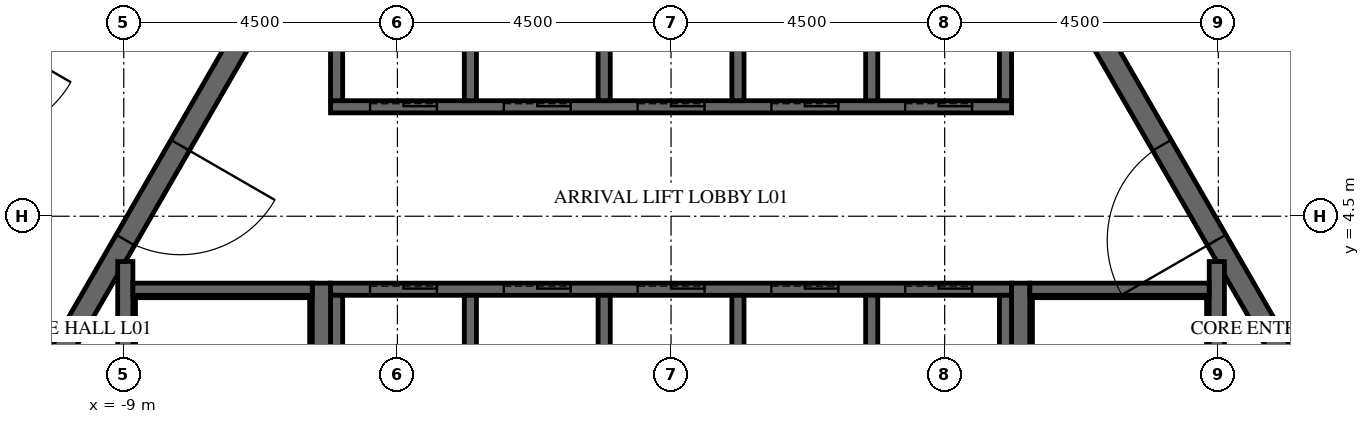
"""IFC4 building model, lengths in metres.
Left out: names, types, materials, properties, quantities, classifications, styles, units other than length and angle.
Written with IfcOpenShell. Run it as: python <this file> out.ifc"""

import sys

from ifc_helpers import new_model, si_unit, direction, frame, frame_2d, origin, place, context, subcontext, project, spatial, polyline, rectangle, outline, extrude, element, fill, save


model = new_model("IFC4")
c1 = context("Model", 3, precision=1e-05, world=origin(), true_north=direction((0.0, 1.0)))
c2 = subcontext(c1, "Body", "Model", "MODEL_VIEW")
j1 = project(units=[si_unit("LENGTHUNIT", "METRE"), si_unit("PLANEANGLEUNIT", "RADIAN")], contexts=[c1])
p1 = place(None, origin())
s1 = spatial("IfcSite", under=j1, at=p1, CompositionType="ELEMENT")
p2 = place(p1, origin())
s2 = spatial("IfcBuilding", under=s1, at=p2, CompositionType="ELEMENT")
p3 = place(p2, frame((0.0, 0.0, 9.0)))
s3 = spatial("IfcBuildingStorey", under=s2, at=p3, CompositionType="ELEMENT", Elevation=9.0)
p4 = place(p3, frame((-7.91, 13.7, -0.25), z_axis=(0.0, 0.0, 1.0), x_axis=(-0.499999880136, -0.866025472988, 0.0)))
e1 = element("IfcWall", 1, at=p4, inside=s3, PredefinedType="SHEAR", context=c2, shape_type="SweptSolid", body=[
    extrude(outline(polyline([(-0.173, -0.3), (15.993, -0.3), (15.646, 0.3), (0.173, 0.3), (-0.173, -0.3)])), origin(), (0.0, 0.0, 1.0), 6.0),
])
p5 = place(p4, frame((7.039, 0.0, 0.25)))
e2 = element("IfcOpeningElement", 2, at=p5, cuts=e1, PredefinedType="OPENING", context=c2, shape_type="SweptSolid", body=[
    extrude(rectangle(XDim=1.8, YDim=2.4, at=frame_2d((0.9, 1.2))), frame((0.0, 0.31, 0.0), z_axis=(0.0, -1.0, 0.0), x_axis=(1.0, 0.0, 0.0)), (0.0, 0.0, 1.0), 0.62),
])
p6 = place(p3, frame((15.819, 0.0, -0.25), z_axis=(0.0, 0.0, 1.0), x_axis=(-0.499999880136, 0.866025472988, 0.0)))
e3 = element("IfcWall", 3, at=p6, inside=s3, PredefinedType="SHEAR", context=c2, shape_type="SweptSolid", body=[
    extrude(outline(polyline([(-0.173, -0.3), (15.993, -0.3), (15.646, 0.3), (0.173, 0.3), (-0.173, -0.3)])), origin(), (0.0, 0.0, 1.0), 6.0),
])
p7 = place(p6, frame((6.981, 0.0, 0.25)))
e4 = element("IfcOpeningElement", 4, at=p7, cuts=e3, PredefinedType="OPENING", context=c2, shape_type="SweptSolid", body=[
    extrude(rectangle(XDim=1.8, YDim=2.4, at=frame_2d((0.9, 1.2))), frame((0.0, 0.31, 0.0), z_axis=(0.0, -1.0, 0.0), x_axis=(1.0, 0.0, 0.0)), (0.0, 0.0, 1.0), 0.62),
])
p8 = place(p3, frame((-5.673, 9.825, -0.25), z_axis=(0.0, 0.0, 1.0), x_axis=(-0.499995046907, -0.866028263435, 0.0)))
e5 = element("IfcWall", 5, at=p8, inside=s3, PredefinedType="SHEAR", context=c2, shape_type="SweptSolid", body=[
    extrude(outline(polyline([(-0.101, -0.175), (11.446, -0.175), (11.244, 0.175), (0.101, 0.175), (-0.101, -0.175)])), origin(), (0.0, 0.0, 1.0), 6.0),
])
p9 = place(p8, frame((4.801, 0.0, 0.25)))
e6 = element("IfcOpeningElement", 6, at=p9, cuts=e5, PredefinedType="OPENING", context=c2, shape_type="SweptSolid", body=[
    extrude(rectangle(XDim=1.8, YDim=2.4, at=frame_2d((0.9, 1.2))), frame((0.0, 0.185, 0.0), z_axis=(0.0, -1.0, 0.0), x_axis=(1.0, 0.0, 0.0)), (0.0, 0.0, 1.0), 0.37),
])
p10 = place(p3, frame((11.345, 0.0, -0.25), z_axis=(0.0, 0.0, 1.0), x_axis=(-0.499995046907, 0.866028263435, 0.0)))
e7 = element("IfcWall", 7, at=p10, inside=s3, PredefinedType="SHEAR", context=c2, shape_type="SweptSolid", body=[
    extrude(outline(polyline([(-0.101, -0.175), (11.446, -0.175), (11.244, 0.175), (0.101, 0.175), (-0.101, -0.175)])), origin(), (0.0, 0.0, 1.0), 6.0),
])
p11 = place(p10, frame((4.744, 0.0, 0.25)))
e8 = element("IfcOpeningElement", 8, at=p11, cuts=e7, PredefinedType="OPENING", context=c2, shape_type="SweptSolid", body=[
    extrude(rectangle(XDim=1.8, YDim=2.4, at=frame_2d((0.9, 1.2))), frame((0.0, 0.185, 0.0), z_axis=(0.0, -1.0, 0.0), x_axis=(1.0, 0.0, 0.0)), (0.0, 0.0, 1.0), 0.37),
])
p12 = place(p3, frame((-5.6, 6.3, -0.25), z_axis=(0.0, 0.0, 1.0), x_axis=(1.0, 0.0, 0.0)))
e9 = element("IfcWall", 9, at=p12, inside=s3, PredefinedType="SHEAR", context=c2, shape_type="SweptSolid", body=[
    extrude(rectangle(XDim=11.2, YDim=0.2, at=frame_2d((5.6, 0.0))), origin(), (0.0, 0.0, 1.0), 6.0),
])
p13 = place(p12, frame((0.65, 0.0, 0.25)))
e10 = element("IfcOpeningElement", 10, at=p13, cuts=e9, PredefinedType="OPENING", context=c2, shape_type="SweptSolid", body=[
    extrude(rectangle(XDim=1.1, YDim=2.1, at=frame_2d((0.55, 1.05))), frame((0.0, 0.11, 0.0), z_axis=(0.0, -1.0, 0.0), x_axis=(1.0, 0.0, 0.0)), (0.0, 0.0, 1.0), 0.22),
])
p14 = place(p12, frame((2.85, 0.0, 0.25)))
e11 = element("IfcOpeningElement", 11, at=p14, cuts=e9, PredefinedType="OPENING", context=c2, shape_type="SweptSolid", body=[
    extrude(rectangle(XDim=1.1, YDim=2.1, at=frame_2d((0.55, 1.05))), frame((0.0, 0.11, 0.0), z_axis=(0.0, -1.0, 0.0), x_axis=(1.0, 0.0, 0.0)), (0.0, 0.0, 1.0), 0.22),
])
p15 = place(p12, frame((5.05, 0.0, 0.25)))
e12 = element("IfcOpeningElement", 12, at=p15, cuts=e9, PredefinedType="OPENING", context=c2, shape_type="SweptSolid", body=[
    extrude(rectangle(XDim=1.1, YDim=2.1, at=frame_2d((0.55, 1.05))), frame((0.0, 0.11, 0.0), z_axis=(0.0, -1.0, 0.0), x_axis=(1.0, 0.0, 0.0)), (0.0, 0.0, 1.0), 0.22),
])
p16 = place(p12, frame((7.25, 0.0, 0.25)))
e13 = element("IfcOpeningElement", 13, at=p16, cuts=e9, PredefinedType="OPENING", context=c2, shape_type="SweptSolid", body=[
    extrude(rectangle(XDim=1.1, YDim=2.1, at=frame_2d((0.55, 1.05))), frame((0.0, 0.11, 0.0), z_axis=(0.0, -1.0, 0.0), x_axis=(1.0, 0.0, 0.0)), (0.0, 0.0, 1.0), 0.22),
])
p17 = place(p12, frame((9.45, 0.0, 0.25)))
e14 = element("IfcOpeningElement", 14, at=p17, cuts=e9, PredefinedType="OPENING", context=c2, shape_type="SweptSolid", body=[
    extrude(rectangle(XDim=1.1, YDim=2.1, at=frame_2d((0.55, 1.05))), frame((0.0, 0.11, 0.0), z_axis=(0.0, -1.0, 0.0), x_axis=(1.0, 0.0, 0.0)), (0.0, 0.0, 1.0), 0.22),
])
for number, where, z_axis, x_axis in (
    (15, (-5.5, 6.4, -0.25), (0.0, 0.0, 1.0), (0.0, 1.0, 0.0)),
    (16, (-3.3, 6.4, -0.25), (0.0, 0.0, 1.0), (0.0, 1.0, 0.0)),
    (17, (-1.1, 6.4, -0.25), (0.0, 0.0, 1.0), (0.0, 1.0, 0.0)),
    (18, (1.1, 6.4, -0.25), (0.0, 0.0, 1.0), (0.0, 1.0, 0.0)),
    (19, (3.3, 6.4, -0.25), (0.0, 0.0, 1.0), (0.0, 1.0, 0.0)),
    (20, (5.5, 6.4, -0.25), (0.0, 0.0, 1.0), (0.0, 1.0, 0.0)),
):
    element("IfcWall", number, at=place(p3, frame(where, z_axis=z_axis, x_axis=x_axis)), inside=s3, PredefinedType="SHEAR", context=c2, shape_type="SweptSolid", body=[
        extrude(rectangle(XDim=2.9, YDim=0.2, at=frame_2d((1.45, 0.0))), origin(), (0.0, 0.0, 1.0), 6.0),
    ])
p18 = place(p3, frame((-5.6, 3.3, -0.25), z_axis=(0.0, 0.0, 1.0), x_axis=(1.0, 0.0, 0.0)))
e21 = element("IfcWall", 21, at=p18, inside=s3, PredefinedType="SHEAR", context=c2, shape_type="SweptSolid", body=[
    extrude(rectangle(XDim=11.2, YDim=0.2, at=frame_2d((5.6, 0.0))), origin(), (0.0, 0.0, 1.0), 6.0),
])
p19 = place(p18, frame((0.65, 0.0, 0.25)))
e22 = element("IfcOpeningElement", 22, at=p19, cuts=e21, PredefinedType="OPENING", context=c2, shape_type="SweptSolid", body=[
    extrude(rectangle(XDim=1.1, YDim=2.1, at=frame_2d((0.55, 1.05))), frame((0.0, 0.11, 0.0), z_axis=(0.0, -1.0, 0.0), x_axis=(1.0, 0.0, 0.0)), (0.0, 0.0, 1.0), 0.22),
])
p20 = place(p18, frame((2.85, 0.0, 0.25)))
e23 = element("IfcOpeningElement", 23, at=p20, cuts=e21, PredefinedType="OPENING", context=c2, shape_type="SweptSolid", body=[
    extrude(rectangle(XDim=1.1, YDim=2.1, at=frame_2d((0.55, 1.05))), frame((0.0, 0.11, 0.0), z_axis=(0.0, -1.0, 0.0), x_axis=(1.0, 0.0, 0.0)), (0.0, 0.0, 1.0), 0.22),
])
p21 = place(p18, frame((5.05, 0.0, 0.25)))
e24 = element("IfcOpeningElement", 24, at=p21, cuts=e21, PredefinedType="OPENING", context=c2, shape_type="SweptSolid", body=[
    extrude(rectangle(XDim=1.1, YDim=2.1, at=frame_2d((0.55, 1.05))), frame((0.0, 0.11, 0.0), z_axis=(0.0, -1.0, 0.0), x_axis=(1.0, 0.0, 0.0)), (0.0, 0.0, 1.0), 0.22),
])
p22 = place(p18, frame((7.25, 0.0, 0.25)))
e25 = element("IfcOpeningElement", 25, at=p22, cuts=e21, PredefinedType="OPENING", context=c2, shape_type="SweptSolid", body=[
    extrude(rectangle(XDim=1.1, YDim=2.1, at=frame_2d((0.55, 1.05))), frame((0.0, 0.11, 0.0), z_axis=(0.0, -1.0, 0.0), x_axis=(1.0, 0.0, 0.0)), (0.0, 0.0, 1.0), 0.22),
])
p23 = place(p18, frame((9.45, 0.0, 0.25)))
e26 = element("IfcOpeningElement", 26, at=p23, cuts=e21, PredefinedType="OPENING", context=c2, shape_type="SweptSolid", body=[
    extrude(rectangle(XDim=1.1, YDim=2.1, at=frame_2d((0.55, 1.05))), frame((0.0, 0.11, 0.0), z_axis=(0.0, -1.0, 0.0), x_axis=(1.0, 0.0, 0.0)), (0.0, 0.0, 1.0), 0.22),
])
for number, where, z_axis, x_axis in (
    (27, (-5.5, 0.1, -0.25), (0.0, 0.0, 1.0), (0.0, 1.0, 0.0)),
    (28, (-3.3, 0.1, -0.25), (0.0, 0.0, 1.0), (0.0, 1.0, 0.0)),
    (29, (-1.1, 0.1, -0.25), (0.0, 0.0, 1.0), (0.0, 1.0, 0.0)),
    (30, (1.1, 0.1, -0.25), (0.0, 0.0, 1.0), (0.0, 1.0, 0.0)),
    (31, (3.3, 0.1, -0.25), (0.0, 0.0, 1.0), (0.0, 1.0, 0.0)),
    (32, (5.5, 0.1, -0.25), (0.0, 0.0, 1.0), (0.0, 1.0, 0.0)),
):
    element("IfcWall", number, at=place(p3, frame(where, z_axis=z_axis, x_axis=x_axis)), inside=s3, PredefinedType="SHEAR", context=c2, shape_type="SweptSolid", body=[
        extrude(rectangle(XDim=3.1, YDim=0.2, at=frame_2d((1.55, 0.0))), origin(), (0.0, 0.0, 1.0), 6.0),
    ])
p24 = place(p3, frame((5.75, -3.4, -0.25), z_axis=(0.0, 0.0, 1.0), x_axis=(0.0, 1.0, 0.0)))
e33 = element("IfcWall", 33, at=p24, inside=s3, PredefinedType="SHEAR", context=c2, shape_type="SweptSolid", body=[
    extrude(rectangle(XDim=6.8, YDim=0.3, at=frame_2d((3.4, 0.0))), origin(), (0.0, 0.0, 1.0), 6.0),
])
p25 = place(p3, frame((8.975, -3.755, -0.25), z_axis=(0.0, 0.0, 1.0), x_axis=(0.0, 1.0, 0.0)))
e34 = element("IfcWall", 34, at=p25, inside=s3, PredefinedType="SHEAR", context=c2, shape_type="SweptSolid", body=[
    extrude(rectangle(XDim=7.51, YDim=0.25, at=frame_2d((3.755, 0.0))), origin(), (0.0, 0.0, 1.0), 6.0),
])
p26 = place(p3, frame((5.9, 3.3, -0.25), z_axis=(0.0, 0.0, 1.0), x_axis=(1.0, 0.0, 0.0)))
e35 = element("IfcWall", 35, at=p26, inside=s3, PredefinedType="SHEAR", context=c2, shape_type="SweptSolid", body=[
    extrude(rectangle(XDim=2.95, YDim=0.2, at=frame_2d((1.475, 0.0))), origin(), (0.0, 0.0, 1.0), 6.0),
])
p27 = place(p3, frame((-5.75, -3.4, -0.25), z_axis=(0.0, 0.0, 1.0), x_axis=(0.0, 1.0, 0.0)))
e36 = element("IfcWall", 36, at=p27, inside=s3, PredefinedType="SHEAR", context=c2, shape_type="SweptSolid", body=[
    extrude(rectangle(XDim=6.8, YDim=0.3, at=frame_2d((3.4, 0.0))), origin(), (0.0, 0.0, 1.0), 6.0),
])
p28 = place(p3, frame((-8.975, -3.755, -0.25), z_axis=(0.0, 0.0, 1.0), x_axis=(0.0, 1.0, 0.0)))
e37 = element("IfcWall", 37, at=p28, inside=s3, PredefinedType="SHEAR", context=c2, shape_type="SweptSolid", body=[
    extrude(rectangle(XDim=7.51, YDim=0.25, at=frame_2d((3.755, 0.0))), origin(), (0.0, 0.0, 1.0), 6.0),
])
p29 = place(p3, frame((-8.85, 3.3, -0.25), z_axis=(0.0, 0.0, 1.0), x_axis=(1.0, 0.0, 0.0)))
e38 = element("IfcWall", 38, at=p29, inside=s3, PredefinedType="SHEAR", context=c2, shape_type="SweptSolid", body=[
    extrude(rectangle(XDim=2.95, YDim=0.2, at=frame_2d((1.475, 0.0))), origin(), (0.0, 0.0, 1.0), 6.0),
])
p30 = place(p9, origin())
e39 = element("IfcDoor", 39, at=p30, inside=s3, OperationType="DOUBLE_DOOR_SINGLE_SWING", PredefinedType="DOOR", context=c2, shape_type="SweptSolid", body=[
    extrude(rectangle(XDim=1.8, YDim=2.4, at=frame_2d((0.9, 1.2))), frame((0.0, 0.025, 0.0), z_axis=(0.0, -1.0, 0.0), x_axis=(1.0, 0.0, 0.0)), (0.0, 0.0, 1.0), 0.05),
])
fill(e6, e39)
p31 = place(p11, origin())
e40 = element("IfcDoor", 40, at=p31, inside=s3, OperationType="DOUBLE_DOOR_SINGLE_SWING", PredefinedType="DOOR", context=c2, shape_type="SweptSolid", body=[
    extrude(rectangle(XDim=1.8, YDim=2.4, at=frame_2d((0.9, 1.2))), frame((0.0, 0.025, 0.0), z_axis=(0.0, -1.0, 0.0), x_axis=(1.0, 0.0, 0.0)), (0.0, 0.0, 1.0), 0.05),
])
fill(e8, e40)
p32 = place(p13, origin())
e41 = element("IfcDoor", 41, at=p32, inside=s3, OperationType="SLIDING_TO_LEFT", PredefinedType="DOOR", context=c2, shape_type="SweptSolid", body=[
    extrude(rectangle(XDim=1.1, YDim=2.1, at=frame_2d((0.55, 1.05))), frame((0.0, 0.025, 0.0), z_axis=(0.0, -1.0, 0.0), x_axis=(1.0, 0.0, 0.0)), (0.0, 0.0, 1.0), 0.05),
])
fill(e10, e41)
p33 = place(p14, origin())
e42 = element("IfcDoor", 42, at=p33, inside=s3, OperationType="SLIDING_TO_LEFT", PredefinedType="DOOR", context=c2, shape_type="SweptSolid", body=[
    extrude(rectangle(XDim=1.1, YDim=2.1, at=frame_2d((0.55, 1.05))), frame((0.0, 0.025, 0.0), z_axis=(0.0, -1.0, 0.0), x_axis=(1.0, 0.0, 0.0)), (0.0, 0.0, 1.0), 0.05),
])
fill(e11, e42)
p34 = place(p15, origin())
e43 = element("IfcDoor", 43, at=p34, inside=s3, OperationType="SLIDING_TO_LEFT", PredefinedType="DOOR", context=c2, shape_type="SweptSolid", body=[
    extrude(rectangle(XDim=1.1, YDim=2.1, at=frame_2d((0.55, 1.05))), frame((0.0, 0.025, 0.0), z_axis=(0.0, -1.0, 0.0), x_axis=(1.0, 0.0, 0.0)), (0.0, 0.0, 1.0), 0.05),
])
fill(e12, e43)
p35 = place(p16, origin())
e44 = element("IfcDoor", 44, at=p35, inside=s3, OperationType="SLIDING_TO_LEFT", PredefinedType="DOOR", context=c2, shape_type="SweptSolid", body=[
    extrude(rectangle(XDim=1.1, YDim=2.1, at=frame_2d((0.55, 1.05))), frame((0.0, 0.025, 0.0), z_axis=(0.0, -1.0, 0.0), x_axis=(1.0, 0.0, 0.0)), (0.0, 0.0, 1.0), 0.05),
])
fill(e13, e44)
p36 = place(p17, origin())
e45 = element("IfcDoor", 45, at=p36, inside=s3, OperationType="SLIDING_TO_LEFT", PredefinedType="DOOR", context=c2, shape_type="SweptSolid", body=[
    extrude(rectangle(XDim=1.1, YDim=2.1, at=frame_2d((0.55, 1.05))), frame((0.0, 0.025, 0.0), z_axis=(0.0, -1.0, 0.0), x_axis=(1.0, 0.0, 0.0)), (0.0, 0.0, 1.0), 0.05),
])
fill(e14, e45)
p37 = place(p19, origin())
e46 = element("IfcDoor", 46, at=p37, inside=s3, OperationType="SLIDING_TO_LEFT", PredefinedType="DOOR", context=c2, shape_type="SweptSolid", body=[
    extrude(rectangle(XDim=1.1, YDim=2.1, at=frame_2d((0.55, 1.05))), frame((0.0, 0.025, 0.0), z_axis=(0.0, -1.0, 0.0), x_axis=(1.0, 0.0, 0.0)), (0.0, 0.0, 1.0), 0.05),
])
fill(e22, e46)
p38 = place(p20, origin())
e47 = element("IfcDoor", 47, at=p38, inside=s3, OperationType="SLIDING_TO_LEFT", PredefinedType="DOOR", context=c2, shape_type="SweptSolid", body=[
    extrude(rectangle(XDim=1.1, YDim=2.1, at=frame_2d((0.55, 1.05))), frame((0.0, 0.025, 0.0), z_axis=(0.0, -1.0, 0.0), x_axis=(1.0, 0.0, 0.0)), (0.0, 0.0, 1.0), 0.05),
])
fill(e23, e47)
p39 = place(p21, origin())
e48 = element("IfcDoor", 48, at=p39, inside=s3, OperationType="SLIDING_TO_LEFT", PredefinedType="DOOR", context=c2, shape_type="SweptSolid", body=[
    extrude(rectangle(XDim=1.1, YDim=2.1, at=frame_2d((0.55, 1.05))), frame((0.0, 0.025, 0.0), z_axis=(0.0, -1.0, 0.0), x_axis=(1.0, 0.0, 0.0)), (0.0, 0.0, 1.0), 0.05),
])
fill(e24, e48)
p40 = place(p22, origin())
e49 = element("IfcDoor", 49, at=p40, inside=s3, OperationType="SLIDING_TO_LEFT", PredefinedType="DOOR", context=c2, shape_type="SweptSolid", body=[
    extrude(rectangle(XDim=1.1, YDim=2.1, at=frame_2d((0.55, 1.05))), frame((0.0, 0.025, 0.0), z_axis=(0.0, -1.0, 0.0), x_axis=(1.0, 0.0, 0.0)), (0.0, 0.0, 1.0), 0.05),
])
fill(e25, e49)
p41 = place(p23, origin())
e50 = element("IfcDoor", 50, at=p41, inside=s3, OperationType="SLIDING_TO_LEFT", PredefinedType="DOOR", context=c2, shape_type="SweptSolid", body=[
    extrude(rectangle(XDim=1.1, YDim=2.1, at=frame_2d((0.55, 1.05))), frame((0.0, 0.025, 0.0), z_axis=(0.0, -1.0, 0.0), x_axis=(1.0, 0.0, 0.0)), (0.0, 0.0, 1.0), 0.05),
])
fill(e26, e50)
save(model, sys.argv[1])
